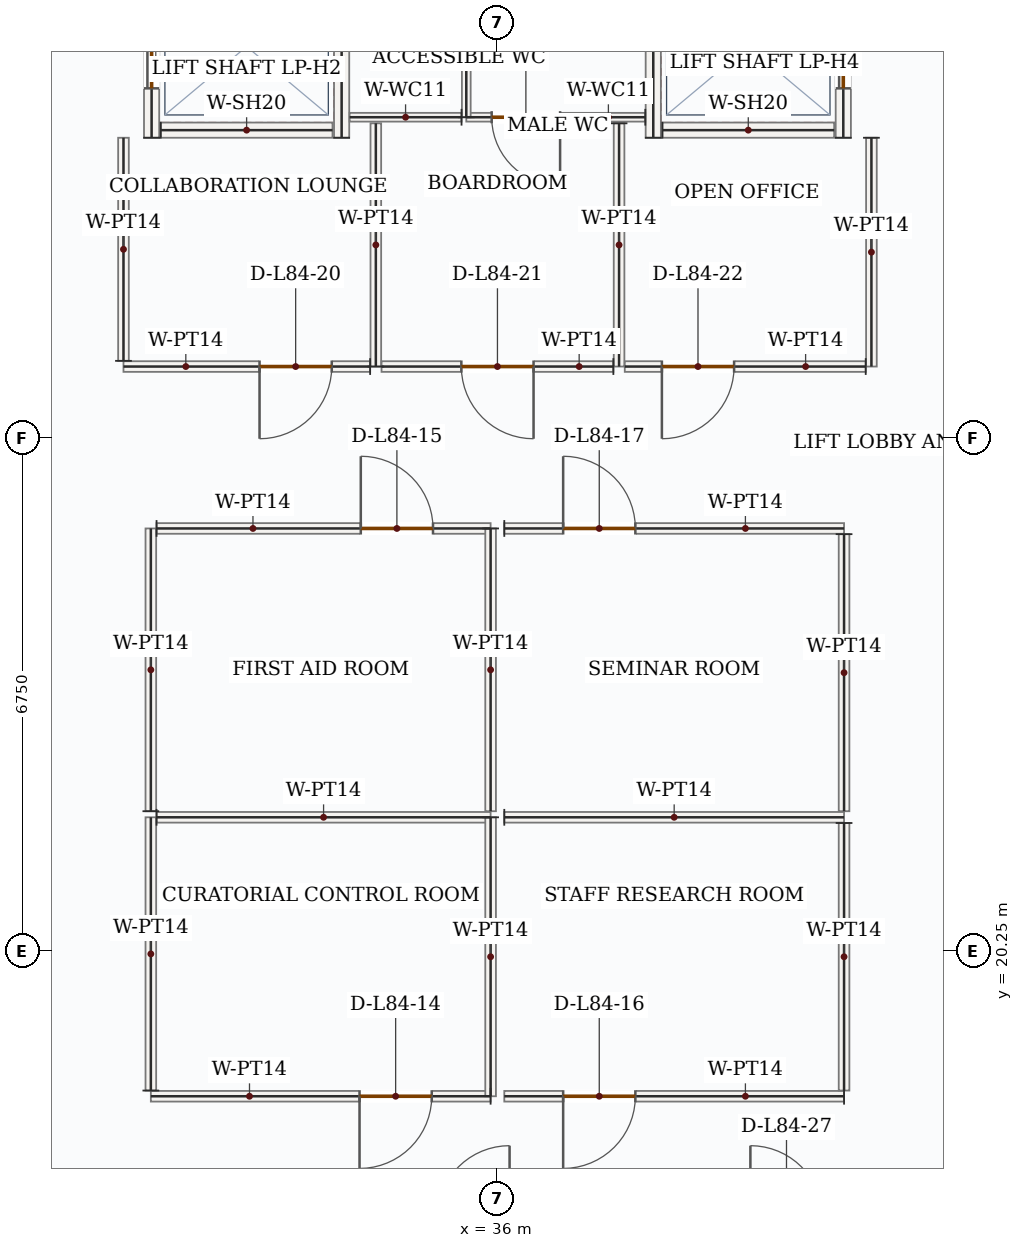
"""IFC4 building model, lengths in metres.
Left out: names, types, materials, properties, quantities, classifications, styles, units other than length and angle.
Written with IfcOpenShell. Run it as: python <this file> out.ifc"""

import sys

from ifc_helpers import new_model, si_unit, direction, frame, frame_2d, origin, place, context, subcontext, project, spatial, rectangle, extrude, source, transform, mapped, element, fill, save


model = new_model("IFC4")
c1 = context("Model", 3, precision=1e-05, world=origin(), true_north=direction((0.0, 1.0)))
c2 = subcontext(c1, "Body", "Model", "MODEL_VIEW")
j1 = project(units=[si_unit("LENGTHUNIT", "METRE"), si_unit("PLANEANGLEUNIT", "RADIAN")], contexts=[c1])
p1 = place(None, origin())
s1 = spatial("IfcSite", under=j1, at=p1, CompositionType="ELEMENT")
p2 = place(p1, origin())
s2 = spatial("IfcBuilding", under=s1, at=p2, CompositionType="ELEMENT")
p3 = place(p2, frame((0.0, 0.0, 346.05)))
s3 = spatial("IfcBuildingStorey", under=s2, at=p3, CompositionType="ELEMENT", Elevation=346.05)
p4 = place(p3, frame((31.45, 30.95, 0.0), z_axis=(0.0, 0.0, 1.0), x_axis=(0.0, 1.0, 0.0)))
e1 = element("IfcWall", 1, at=p4, inside=s3, PredefinedType="SOLIDWALL", context=c2, shape_type="SweptSolid", body=[
    extrude(rectangle(XDim=2.4, YDim=0.2, at=frame_2d((1.2, 0.0))), origin(), (0.0, 0.0, 1.0), 3.5),
])
p5 = place(p4, frame((0.65, 0.0, 0.0)))
e2 = element("IfcOpeningElement", 2, at=p5, cuts=e1, PredefinedType="OPENING", context=c2, shape_type="SweptSolid", body=[
    extrude(rectangle(XDim=1.1, YDim=2.15, at=frame_2d((0.55, 1.075))), frame((0.0, 0.11, 0.0), z_axis=(0.0, -1.0, 0.0), x_axis=(1.0, 0.0, 0.0)), (0.0, 0.0, 1.0), 0.22),
])
m1 = source(origin(), c2, "Body", "SweptSolid", [
    extrude(rectangle(XDim=2.4, YDim=0.2, at=frame_2d((1.2, 0.0))), origin(), (0.0, 0.0, 1.0), 3.5),
])
p6 = place(p3, frame((33.95, 30.95, 0.0), z_axis=(0.0, 0.0, 1.0), x_axis=(0.0, 1.0, 0.0)))
e3 = element("IfcWall", 3, at=p6, inside=s3, PredefinedType="SOLIDWALL", context=c2, shape_type="MappedRepresentation", body=[
    mapped(m1, transform((0.0, 0.0, 0.0), x_axis=(1.0, 0.0, 0.0), y_axis=(0.0, 1.0, 0.0), z_axis=(0.0, 0.0, 1.0), scale=1.0)),
])
m2 = source(origin(), c2, "Body", "SweptSolid", [
    extrude(rectangle(XDim=2.26, YDim=0.2, at=frame_2d((1.13, 0.0))), origin(), (0.0, 0.0, 1.0), 3.5),
])
p7 = place(p3, frame((31.57, 31.05, 0.0), z_axis=(0.0, 0.0, 1.0), x_axis=(1.0, 0.0, 0.0)))
e4 = element("IfcWall", 4, at=p7, inside=s3, PredefinedType="SOLIDWALL", context=c2, shape_type="MappedRepresentation", body=[
    mapped(m2, transform((0.0, 0.0, 0.0), x_axis=(1.0, 0.0, 0.0), y_axis=(0.0, 1.0, 0.0), z_axis=(0.0, 0.0, 1.0), scale=1.0)),
])
p8 = place(p3, frame((38.05, 30.95, 0.0), z_axis=(0.0, 0.0, 1.0), x_axis=(0.0, 1.0, 0.0)))
e5 = element("IfcWall", 5, at=p8, inside=s3, PredefinedType="SOLIDWALL", context=c2, shape_type="MappedRepresentation", body=[
    mapped(m1, transform((0.0, 0.0, 0.0), x_axis=(1.0, 0.0, 0.0), y_axis=(0.0, 1.0, 0.0), z_axis=(0.0, 0.0, 1.0), scale=1.0)),
])
p9 = place(p3, frame((40.55, 30.95, 0.0), z_axis=(0.0, 0.0, 1.0), x_axis=(0.0, 1.0, 0.0)))
e6 = element("IfcWall", 6, at=p9, inside=s3, PredefinedType="SOLIDWALL", context=c2, shape_type="SweptSolid", body=[
    extrude(rectangle(XDim=2.4, YDim=0.2, at=frame_2d((1.2, 0.0))), origin(), (0.0, 0.0, 1.0), 3.5),
])
p10 = place(p9, frame((0.65, 0.0, 0.0)))
e7 = element("IfcOpeningElement", 7, at=p10, cuts=e6, PredefinedType="OPENING", context=c2, shape_type="SweptSolid", body=[
    extrude(rectangle(XDim=1.1, YDim=2.15, at=frame_2d((0.55, 1.075))), frame((0.0, 0.11, 0.0), z_axis=(0.0, -1.0, 0.0), x_axis=(1.0, 0.0, 0.0)), (0.0, 0.0, 1.0), 0.22),
])
p11 = place(p3, frame((38.17, 31.05, 0.0), z_axis=(0.0, 0.0, 1.0), x_axis=(1.0, 0.0, 0.0)))
e8 = element("IfcWall", 8, at=p11, inside=s3, PredefinedType="SOLIDWALL", context=c2, shape_type="MappedRepresentation", body=[
    mapped(m2, transform((0.0, 0.0, 0.0), x_axis=(1.0, 0.0, 0.0), y_axis=(0.0, 1.0, 0.0), z_axis=(0.0, 0.0, 1.0), scale=1.0)),
])
p12 = place(p3, frame((37.945, 31.22, 0.0), z_axis=(0.0, 0.0, 1.0), x_axis=(-1.0, 0.0, 0.0)))
e9 = element("IfcWall", 9, at=p12, inside=s3, PredefinedType="PARTITIONING", context=c2, shape_type="SweptSolid", body=[
    extrude(rectangle(XDim=2.355, YDim=0.115, at=frame_2d((1.177, 0.0))), origin(), (0.0, 0.0, 1.0), 3.5),
])
p13 = place(p12, frame((1.121, 0.0, 0.0)))
e10 = element("IfcOpeningElement", 10, at=p13, cuts=e9, PredefinedType="OPENING", context=c2, shape_type="SweptSolid", body=[
    extrude(rectangle(XDim=0.9, YDim=2.1, at=frame_2d((0.45, 1.05))), frame((0.0, 0.067, 0.0), z_axis=(0.0, -1.0, 0.0), x_axis=(1.0, 0.0, 0.0)), (0.0, 0.0, 1.0), 0.135),
])
m3 = source(origin(), c2, "Body", "SweptSolid", [
    extrude(rectangle(XDim=1.96, YDim=0.115, at=frame_2d((0.98, 0.0))), origin(), (0.0, 0.0, 1.0), 3.5),
])
p14 = place(p3, frame((35.59, 31.22, 0.0), z_axis=(0.0, 0.0, 1.0), x_axis=(0.0, 1.0, 0.0)))
e11 = element("IfcWall", 11, at=p14, inside=s3, PredefinedType="PARTITIONING", context=c2, shape_type="MappedRepresentation", body=[
    mapped(m3, transform((0.0, 0.0, 0.0), x_axis=(1.0, 0.0, 0.0), y_axis=(0.0, 1.0, 0.0), z_axis=(0.0, 0.0, 1.0), scale=1.0)),
])
m4 = source(origin(), c2, "Body", "SweptSolid", [
    extrude(rectangle(XDim=1.473, YDim=0.115, at=frame_2d((0.736, 0.0))), origin(), (0.0, 0.0, 1.0), 3.5),
])
p15 = place(p3, frame((35.528, 31.22, 0.0), z_axis=(0.0, 0.0, 1.0), x_axis=(-1.0, 0.0, 0.0)))
e12 = element("IfcWall", 12, at=p15, inside=s3, PredefinedType="PARTITIONING", context=c2, shape_type="MappedRepresentation", body=[
    mapped(m4, transform((0.0, 0.0, 0.0), x_axis=(1.0, 0.0, 0.0), y_axis=(0.0, 1.0, 0.0), z_axis=(0.0, 0.0, 1.0), scale=1.0)),
])
m5 = source(origin(), c2, "Body", "SweptSolid", [
    extrude(rectangle(XDim=3.2, YDim=0.14, at=frame_2d((1.6, 0.0))), origin(), (0.0, 0.0, 1.0), 3.5),
])
for number, where, z_axis, x_axis in (
    (13, (34.4, 27.94, 0.0), (0.0, 0.0, 1.0), (0.0, 1.0, 0.0)),
    (14, (37.6, 31.14, 0.0), (0.0, 0.0, 1.0), (0.0, -1.0, 0.0)),
):
    element("IfcWall", number, at=place(p3, frame(where, z_axis=z_axis, x_axis=x_axis)), inside=s3, PredefinedType="PARTITIONING", context=c2, shape_type="MappedRepresentation", body=[
        mapped(m5, transform((0.0, 0.0, 0.0), x_axis=(1.0, 0.0, 0.0), y_axis=(0.0, 1.0, 0.0), z_axis=(0.0, 0.0, 1.0), scale=1.0)),
    ])
p16 = place(p3, frame((37.525, 27.94, 0.0), z_axis=(0.0, 0.0, 1.0), x_axis=(-1.0, 0.0, 0.0)))
e15 = element("IfcWall", 15, at=p16, inside=s3, PredefinedType="PARTITIONING", context=c2, shape_type="SweptSolid", body=[
    extrude(rectangle(XDim=3.05, YDim=0.14, at=frame_2d((1.525, 0.0))), origin(), (0.0, 0.0, 1.0), 3.5),
])
p17 = place(p16, frame((1.05, 0.0, 0.0)))
e16 = element("IfcOpeningElement", 16, at=p17, cuts=e15, PredefinedType="OPENING", context=c2, shape_type="SweptSolid", body=[
    extrude(rectangle(XDim=0.95, YDim=2.15, at=frame_2d((0.475, 1.075))), frame((0.0, 0.08, 0.0), z_axis=(0.0, -1.0, 0.0), x_axis=(1.0, 0.0, 0.0)), (0.0, 0.0, 1.0), 0.16),
])
p18 = place(p3, frame((34.325, 27.94, 0.0), z_axis=(0.0, 0.0, 1.0), x_axis=(-1.0, 0.0, 0.0)))
e17 = element("IfcWall", 17, at=p18, inside=s3, PredefinedType="PARTITIONING", context=c2, shape_type="SweptSolid", body=[
    extrude(rectangle(XDim=3.245, YDim=0.14, at=frame_2d((1.623, 0.0))), origin(), (0.0, 0.0, 1.0), 3.5),
])
p19 = place(p18, frame((0.505, 0.0, 0.0)))
e18 = element("IfcOpeningElement", 18, at=p19, cuts=e17, PredefinedType="OPENING", context=c2, shape_type="SweptSolid", body=[
    extrude(rectangle(XDim=0.95, YDim=2.15, at=frame_2d((0.475, 1.075))), frame((0.0, 0.08, 0.0), z_axis=(0.0, -1.0, 0.0), x_axis=(1.0, 0.0, 0.0)), (0.0, 0.0, 1.0), 0.16),
])
m6 = source(origin(), c2, "Body", "SweptSolid", [
    extrude(rectangle(XDim=2.935, YDim=0.14, at=frame_2d((1.468, 0.0))), origin(), (0.0, 0.0, 1.0), 3.5),
])
p20 = place(p3, frame((31.08, 28.015, 0.0), z_axis=(0.0, 0.0, 1.0), x_axis=(0.0, 1.0, 0.0)))
e19 = element("IfcWall", 19, at=p20, inside=s3, PredefinedType="PARTITIONING", context=c2, shape_type="MappedRepresentation", body=[
    mapped(m6, transform((0.0, 0.0, 0.0), x_axis=(1.0, 0.0, 0.0), y_axis=(0.0, 1.0, 0.0), z_axis=(0.0, 0.0, 1.0), scale=1.0)),
])
m7 = source(origin(), c2, "Body", "SweptSolid", [
    extrude(rectangle(XDim=3.01, YDim=0.14, at=frame_2d((1.505, 0.0))), origin(), (0.0, 0.0, 1.0), 3.5),
])
p21 = place(p3, frame((40.92, 30.95, 0.0), z_axis=(0.0, 0.0, 1.0), x_axis=(0.0, -1.0, 0.0)))
e20 = element("IfcWall", 20, at=p21, inside=s3, PredefinedType="PARTITIONING", context=c2, shape_type="MappedRepresentation", body=[
    mapped(m7, transform((0.0, 0.0, 0.0), x_axis=(1.0, 0.0, 0.0), y_axis=(0.0, 1.0, 0.0), z_axis=(0.0, 0.0, 1.0), scale=1.0)),
])
p22 = place(p3, frame((40.845, 27.94, 0.0), z_axis=(0.0, 0.0, 1.0), x_axis=(-1.0, 0.0, 0.0)))
e21 = element("IfcWall", 21, at=p22, inside=s3, PredefinedType="PARTITIONING", context=c2, shape_type="SweptSolid", body=[
    extrude(rectangle(XDim=3.17, YDim=0.14, at=frame_2d((1.585, 0.0))), origin(), (0.0, 0.0, 1.0), 3.5),
])
p23 = place(p22, frame((1.732, 0.0, 0.0)))
e22 = element("IfcOpeningElement", 22, at=p23, cuts=e21, PredefinedType="OPENING", context=c2, shape_type="SweptSolid", body=[
    extrude(rectangle(XDim=0.95, YDim=2.15, at=frame_2d((0.475, 1.075))), frame((0.0, 0.08, 0.0), z_axis=(0.0, -1.0, 0.0), x_axis=(1.0, 0.0, 0.0)), (0.0, 0.0, 1.0), 0.16),
])
p24 = place(p3, frame((35.91, 18.34, 0.0), z_axis=(0.0, 0.0, 1.0), x_axis=(-1.0, 0.0, 0.0)))
e23 = element("IfcWall", 23, at=p24, inside=s3, PredefinedType="PARTITIONING", context=c2, shape_type="SweptSolid", body=[
    extrude(rectangle(XDim=4.47, YDim=0.14, at=frame_2d((2.235, 0.0))), origin(), (0.0, 0.0, 1.0), 3.5),
])
p25 = place(p24, frame((0.774, 0.0, 0.0)))
e24 = element("IfcOpeningElement", 24, at=p25, cuts=e23, PredefinedType="OPENING", context=c2, shape_type="SweptSolid", body=[
    extrude(rectangle(XDim=0.95, YDim=2.15, at=frame_2d((0.475, 1.075))), frame((0.0, 0.08, 0.0), z_axis=(0.0, -1.0, 0.0), x_axis=(1.0, 0.0, 0.0)), (0.0, 0.0, 1.0), 0.16),
])
m8 = source(origin(), c2, "Body", "SweptSolid", [
    extrude(rectangle(XDim=3.595, YDim=0.14, at=frame_2d((1.797, 0.0))), origin(), (0.0, 0.0, 1.0), 3.5),
])
p26 = place(p3, frame((31.44, 18.415, 0.0), z_axis=(0.0, 0.0, 1.0), x_axis=(0.0, 1.0, 0.0)))
e25 = element("IfcWall", 25, at=p26, inside=s3, PredefinedType="PARTITIONING", context=c2, shape_type="MappedRepresentation", body=[
    mapped(m8, transform((0.0, 0.0, 0.0), x_axis=(1.0, 0.0, 0.0), y_axis=(0.0, 1.0, 0.0), z_axis=(0.0, 0.0, 1.0), scale=1.0)),
])
m9 = source(origin(), c2, "Body", "SweptSolid", [
    extrude(rectangle(XDim=4.395, YDim=0.14, at=frame_2d((2.198, 0.0))), origin(), (0.0, 0.0, 1.0), 3.5),
])
p27 = place(p3, frame((31.515, 22.01, 0.0), z_axis=(0.0, 0.0, 1.0), x_axis=(1.0, 0.0, 0.0)))
e26 = element("IfcWall", 26, at=p27, inside=s3, PredefinedType="PARTITIONING", context=c2, shape_type="MappedRepresentation", body=[
    mapped(m9, transform((0.0, 0.0, 0.0), x_axis=(1.0, 0.0, 0.0), y_axis=(0.0, 1.0, 0.0), z_axis=(0.0, 0.0, 1.0), scale=1.0)),
])
m10 = source(origin(), c2, "Body", "SweptSolid", [
    extrude(rectangle(XDim=3.67, YDim=0.14, at=frame_2d((1.835, 0.0))), origin(), (0.0, 0.0, 1.0), 3.5),
])
p28 = place(p3, frame((35.91, 22.01, 0.0), z_axis=(0.0, 0.0, 1.0), x_axis=(0.0, -1.0, 0.0)))
e27 = element("IfcWall", 27, at=p28, inside=s3, PredefinedType="PARTITIONING", context=c2, shape_type="MappedRepresentation", body=[
    mapped(m10, transform((0.0, 0.0, 0.0), x_axis=(1.0, 0.0, 0.0), y_axis=(0.0, 1.0, 0.0), z_axis=(0.0, 0.0, 1.0), scale=1.0)),
])
p29 = place(p3, frame((40.56, 18.34, 0.0), z_axis=(0.0, 0.0, 1.0), x_axis=(-1.0, 0.0, 0.0)))
e28 = element("IfcWall", 28, at=p29, inside=s3, PredefinedType="PARTITIONING", context=c2, shape_type="SweptSolid", body=[
    extrude(rectangle(XDim=4.47, YDim=0.14, at=frame_2d((2.235, 0.0))), origin(), (0.0, 0.0, 1.0), 3.5),
])
p30 = place(p29, frame((2.746, 0.0, 0.0)))
e29 = element("IfcOpeningElement", 29, at=p30, cuts=e28, PredefinedType="OPENING", context=c2, shape_type="SweptSolid", body=[
    extrude(rectangle(XDim=0.95, YDim=2.15, at=frame_2d((0.475, 1.075))), frame((0.0, 0.08, 0.0), z_axis=(0.0, -1.0, 0.0), x_axis=(1.0, 0.0, 0.0)), (0.0, 0.0, 1.0), 0.16),
])
m11 = source(origin(), c2, "Body", "SweptSolid", [
    extrude(rectangle(XDim=4.47, YDim=0.14, at=frame_2d((2.235, 0.0))), origin(), (0.0, 0.0, 1.0), 3.5),
])
p31 = place(p3, frame((36.09, 22.01, 0.0), z_axis=(0.0, 0.0, 1.0), x_axis=(1.0, 0.0, 0.0)))
e30 = element("IfcWall", 30, at=p31, inside=s3, PredefinedType="PARTITIONING", context=c2, shape_type="MappedRepresentation", body=[
    mapped(m11, transform((0.0, 0.0, 0.0), x_axis=(1.0, 0.0, 0.0), y_axis=(0.0, 1.0, 0.0), z_axis=(0.0, 0.0, 1.0), scale=1.0)),
])
m12 = source(origin(), c2, "Body", "SweptSolid", [
    extrude(rectangle(XDim=3.52, YDim=0.14, at=frame_2d((1.76, 0.0))), origin(), (0.0, 0.0, 1.0), 3.5),
])
p32 = place(p3, frame((40.56, 21.935, 0.0), z_axis=(0.0, 0.0, 1.0), x_axis=(0.0, -1.0, 0.0)))
e31 = element("IfcWall", 31, at=p32, inside=s3, PredefinedType="PARTITIONING", context=c2, shape_type="MappedRepresentation", body=[
    mapped(m12, transform((0.0, 0.0, 0.0), x_axis=(1.0, 0.0, 0.0), y_axis=(0.0, 1.0, 0.0), z_axis=(0.0, 0.0, 1.0), scale=1.0)),
])
m13 = source(origin(), c2, "Body", "SweptSolid", [
    extrude(rectangle(XDim=3.72, YDim=0.14, at=frame_2d((1.86, 0.0))), origin(), (0.0, 0.0, 1.0), 3.5),
])
p33 = place(p3, frame((31.44, 22.09, 0.0), z_axis=(0.0, 0.0, 1.0), x_axis=(0.0, 1.0, 0.0)))
e32 = element("IfcWall", 32, at=p33, inside=s3, PredefinedType="PARTITIONING", context=c2, shape_type="MappedRepresentation", body=[
    mapped(m13, transform((0.0, 0.0, 0.0), x_axis=(1.0, 0.0, 0.0), y_axis=(0.0, 1.0, 0.0), z_axis=(0.0, 0.0, 1.0), scale=1.0)),
])
p34 = place(p3, frame((31.515, 25.81, 0.0), z_axis=(0.0, 0.0, 1.0), x_axis=(1.0, 0.0, 0.0)))
e33 = element("IfcWall", 33, at=p34, inside=s3, PredefinedType="PARTITIONING", context=c2, shape_type="SweptSolid", body=[
    extrude(rectangle(XDim=4.395, YDim=0.14, at=frame_2d((2.198, 0.0))), origin(), (0.0, 0.0, 1.0), 3.5),
])
p35 = place(p34, frame((2.687, 0.0, 0.0)))
e34 = element("IfcOpeningElement", 34, at=p35, cuts=e33, PredefinedType="OPENING", context=c2, shape_type="SweptSolid", body=[
    extrude(rectangle(XDim=0.95, YDim=2.15, at=frame_2d((0.475, 1.075))), frame((0.0, 0.08, 0.0), z_axis=(0.0, -1.0, 0.0), x_axis=(1.0, 0.0, 0.0)), (0.0, 0.0, 1.0), 0.16),
])
p36 = place(p3, frame((35.91, 25.81, 0.0), z_axis=(0.0, 0.0, 1.0), x_axis=(0.0, -1.0, 0.0)))
e35 = element("IfcWall", 35, at=p36, inside=s3, PredefinedType="PARTITIONING", context=c2, shape_type="MappedRepresentation", body=[
    mapped(m13, transform((0.0, 0.0, 0.0), x_axis=(1.0, 0.0, 0.0), y_axis=(0.0, 1.0, 0.0), z_axis=(0.0, 0.0, 1.0), scale=1.0)),
])
p37 = place(p3, frame((36.09, 25.81, 0.0), z_axis=(0.0, 0.0, 1.0), x_axis=(1.0, 0.0, 0.0)))
e36 = element("IfcWall", 36, at=p37, inside=s3, PredefinedType="PARTITIONING", context=c2, shape_type="SweptSolid", body=[
    extrude(rectangle(XDim=4.47, YDim=0.14, at=frame_2d((2.235, 0.0))), origin(), (0.0, 0.0, 1.0), 3.5),
])
p38 = place(p37, frame((0.774, 0.0, 0.0)))
e37 = element("IfcOpeningElement", 37, at=p38, cuts=e36, PredefinedType="OPENING", context=c2, shape_type="SweptSolid", body=[
    extrude(rectangle(XDim=0.95, YDim=2.15, at=frame_2d((0.475, 1.075))), frame((0.0, 0.08, 0.0), z_axis=(0.0, -1.0, 0.0), x_axis=(1.0, 0.0, 0.0)), (0.0, 0.0, 1.0), 0.16),
])
m14 = source(origin(), c2, "Body", "SweptSolid", [
    extrude(rectangle(XDim=3.645, YDim=0.14, at=frame_2d((1.823, 0.0))), origin(), (0.0, 0.0, 1.0), 3.5),
])
p39 = place(p3, frame((40.56, 25.735, 0.0), z_axis=(0.0, 0.0, 1.0), x_axis=(0.0, -1.0, 0.0)))
e38 = element("IfcWall", 38, at=p39, inside=s3, PredefinedType="PARTITIONING", context=c2, shape_type="MappedRepresentation", body=[
    mapped(m14, transform((0.0, 0.0, 0.0), x_axis=(1.0, 0.0, 0.0), y_axis=(0.0, 1.0, 0.0), z_axis=(0.0, 0.0, 1.0), scale=1.0)),
])
m15 = source(origin(), c2, "Body", "SweptSolid", [
    extrude(rectangle(XDim=1.1, YDim=2.15, at=frame_2d((0.55, 1.075))), frame((0.0, 0.025, 0.0), z_axis=(0.0, -1.0, 0.0), x_axis=(1.0, 0.0, 0.0)), (0.0, 0.0, 1.0), 0.05),
])
p40 = place(p5, origin())
e39 = element("IfcDoor", 39, at=p40, inside=s3, OperationType="DOUBLE_DOOR_SLIDING", PredefinedType="DOOR", context=c2, shape_type="MappedRepresentation", body=[
    mapped(m15, transform((0.0, 0.0, 0.0), x_axis=(1.0, 0.0, 0.0), y_axis=(0.0, 1.0, 0.0), z_axis=(0.0, 0.0, 1.0), scale=1.0)),
])
fill(e2, e39)
p41 = place(p10, origin())
e40 = element("IfcDoor", 40, at=p41, inside=s3, OperationType="DOUBLE_DOOR_SLIDING", PredefinedType="DOOR", context=c2, shape_type="MappedRepresentation", body=[
    mapped(m15, transform((0.0, 0.0, 0.0), x_axis=(1.0, 0.0, 0.0), y_axis=(0.0, 1.0, 0.0), z_axis=(0.0, 0.0, 1.0), scale=1.0)),
])
fill(e7, e40)
m16 = source(origin(), c2, "Body", "SweptSolid", [
    extrude(rectangle(XDim=0.95, YDim=2.15, at=frame_2d((0.475, 1.075))), frame((0.0, 0.025, 0.0), z_axis=(0.0, -1.0, 0.0), x_axis=(1.0, 0.0, 0.0)), (0.0, 0.0, 1.0), 0.05),
])
p42 = place(p25, origin())
e41 = element("IfcDoor", 41, at=p42, inside=s3, OperationType="SINGLE_SWING_RIGHT", PredefinedType="DOOR", context=c2, shape_type="MappedRepresentation", body=[
    mapped(m16, transform((0.0, 0.0, 0.0), x_axis=(1.0, 0.0, 0.0), y_axis=(0.0, 1.0, 0.0), z_axis=(0.0, 0.0, 1.0), scale=1.0)),
])
fill(e24, e41)
p43 = place(p35, origin())
e42 = element("IfcDoor", 42, at=p43, inside=s3, OperationType="SINGLE_SWING_LEFT", PredefinedType="DOOR", context=c2, shape_type="MappedRepresentation", body=[
    mapped(m16, transform((0.0, 0.0, 0.0), x_axis=(1.0, 0.0, 0.0), y_axis=(0.0, 1.0, 0.0), z_axis=(0.0, 0.0, 1.0), scale=1.0)),
])
fill(e34, e42)
p44 = place(p30, origin())
e43 = element("IfcDoor", 43, at=p44, inside=s3, OperationType="SINGLE_SWING_RIGHT", PredefinedType="DOOR", context=c2, shape_type="MappedRepresentation", body=[
    mapped(m16, transform((0.0, 0.0, 0.0), x_axis=(1.0, 0.0, 0.0), y_axis=(0.0, 1.0, 0.0), z_axis=(0.0, 0.0, 1.0), scale=1.0)),
])
fill(e29, e43)
p45 = place(p38, origin())
e44 = element("IfcDoor", 44, at=p45, inside=s3, OperationType="SINGLE_SWING_LEFT", PredefinedType="DOOR", context=c2, shape_type="MappedRepresentation", body=[
    mapped(m16, transform((0.0, 0.0, 0.0), x_axis=(1.0, 0.0, 0.0), y_axis=(0.0, 1.0, 0.0), z_axis=(0.0, 0.0, 1.0), scale=1.0)),
])
fill(e37, e44)
p46 = place(p19, origin())
e45 = element("IfcDoor", 45, at=p46, inside=s3, OperationType="SINGLE_SWING_RIGHT", PredefinedType="DOOR", context=c2, shape_type="MappedRepresentation", body=[
    mapped(m16, transform((0.0, 0.0, 0.0), x_axis=(1.0, 0.0, 0.0), y_axis=(0.0, 1.0, 0.0), z_axis=(0.0, 0.0, 1.0), scale=1.0)),
])
fill(e18, e45)
p47 = place(p17, origin())
e46 = element("IfcDoor", 46, at=p47, inside=s3, OperationType="SINGLE_SWING_LEFT", PredefinedType="DOOR", context=c2, shape_type="MappedRepresentation", body=[
    mapped(m16, transform((0.0, 0.0, 0.0), x_axis=(1.0, 0.0, 0.0), y_axis=(0.0, 1.0, 0.0), z_axis=(0.0, 0.0, 1.0), scale=1.0)),
])
fill(e16, e46)
p48 = place(p23, origin())
e47 = element("IfcDoor", 47, at=p48, inside=s3, OperationType="SINGLE_SWING_RIGHT", PredefinedType="DOOR", context=c2, shape_type="MappedRepresentation", body=[
    mapped(m16, transform((0.0, 0.0, 0.0), x_axis=(1.0, 0.0, 0.0), y_axis=(0.0, 1.0, 0.0), z_axis=(0.0, 0.0, 1.0), scale=1.0)),
])
fill(e22, e47)
m17 = source(origin(), c2, "Body", "SweptSolid", [
    extrude(rectangle(XDim=0.9, YDim=2.1, at=frame_2d((0.45, 1.05))), frame((0.0, 0.025, 0.0), z_axis=(0.0, -1.0, 0.0), x_axis=(1.0, 0.0, 0.0)), (0.0, 0.0, 1.0), 0.05),
])
p49 = place(p13, origin())
e48 = element("IfcDoor", 48, at=p49, inside=s3, OperationType="SINGLE_SWING_LEFT", PredefinedType="DOOR", context=c2, shape_type="MappedRepresentation", body=[
    mapped(m17, transform((0.0, 0.0, 0.0), x_axis=(1.0, 0.0, 0.0), y_axis=(0.0, 1.0, 0.0), z_axis=(0.0, 0.0, 1.0), scale=1.0)),
])
fill(e10, e48)
save(model, sys.argv[1])
